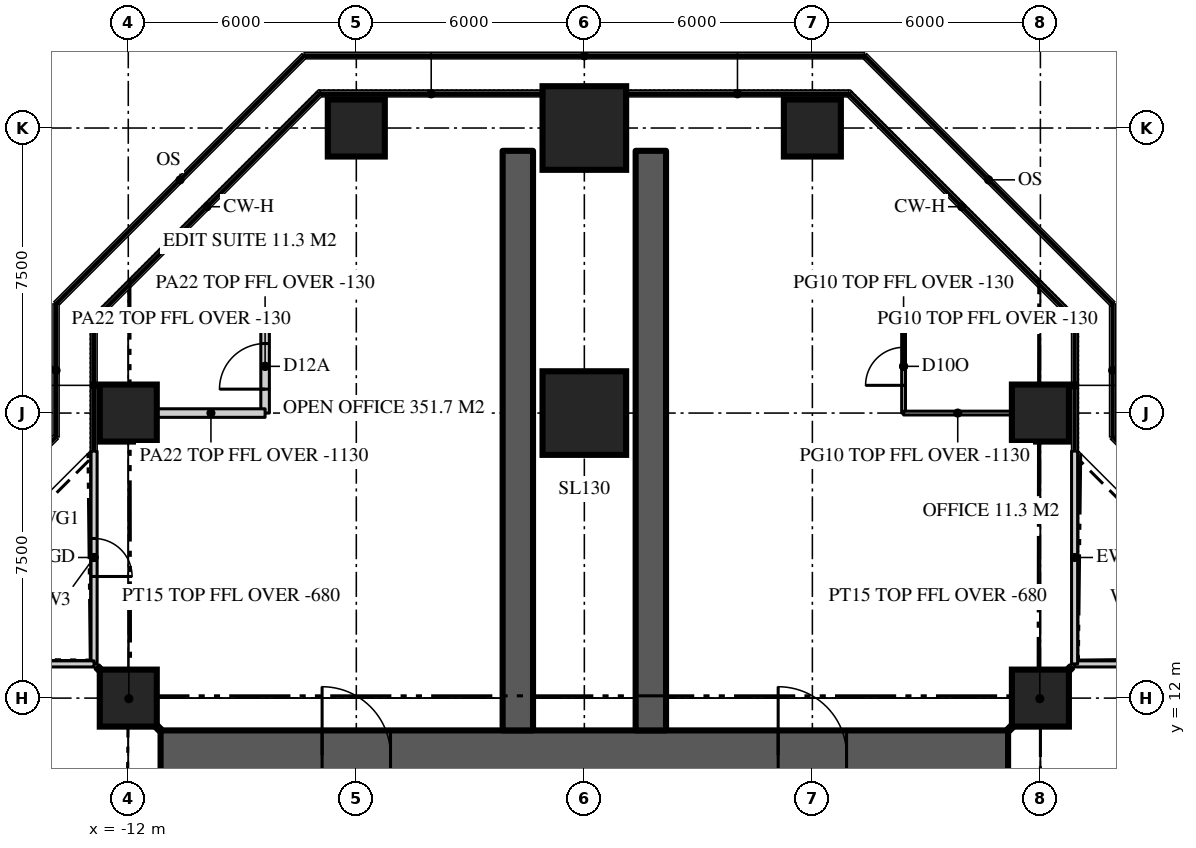
"""IFC4 building model, lengths in metres.
Left out: names, types, materials, properties, quantities, classifications, styles, units other than length and angle.
Written with IfcOpenShell. Run it as: python <this file> out.ifc"""

import sys

from ifc_helpers import new_model, si_unit, direction, frame, frame_2d, origin, origin_2d, place, context, subcontext, project, spatial, rectangle, extrude, element, fill, save


model = new_model("IFC4")
c1 = context("Model", 3, precision=1e-05, world=origin(), true_north=direction((0.0, 1.0)))
c2 = subcontext(c1, "Body", "Model", "MODEL_VIEW")
j1 = project(units=[si_unit("LENGTHUNIT", "METRE"), si_unit("PLANEANGLEUNIT", "RADIAN")], contexts=[c1])
p1 = place(None, origin())
s1 = spatial("IfcSite", under=j1, at=p1, CompositionType="ELEMENT")
p2 = place(p1, origin())
s2 = spatial("IfcBuilding", under=s1, at=p2, CompositionType="ELEMENT")
p3 = place(p2, frame((0.0, 0.0, 255.6)))
s3 = spatial("IfcBuildingStorey", under=s2, at=p3, CompositionType="ELEMENT", Elevation=255.6)
p4 = place(p3, frame((-11.15, 10.5, 0.0), z_axis=(0.0, 0.0, 1.0), x_axis=(1.0, 0.0, 0.0)))
e1 = element("IfcWall", 1, at=p4, inside=s3, PredefinedType="SHEAR", context=c2, shape_type="SweptSolid", body=[
    extrude(rectangle(XDim=22.3, YDim=1.3, at=frame_2d((11.15, 0.0))), origin(), (0.0, 0.0, 1.0), 3.9),
])
p5 = place(p4, frame((4.25, 0.0, 0.0)))
e2 = element("IfcOpeningElement", 2, at=p5, cuts=e1, PredefinedType="OPENING", context=c2, shape_type="SweptSolid", body=[
    extrude(rectangle(XDim=1.8, YDim=2.2, at=frame_2d((0.9, 1.1))), frame((0.0, 0.66, 0.0), z_axis=(0.0, -1.0, 0.0), x_axis=(1.0, 0.0, 0.0)), (0.0, 0.0, 1.0), 1.32),
])
p6 = place(p4, frame((16.25, 0.0, 0.0)))
e3 = element("IfcOpeningElement", 3, at=p6, cuts=e1, PredefinedType="OPENING", context=c2, shape_type="SweptSolid", body=[
    extrude(rectangle(XDim=1.8, YDim=2.2, at=frame_2d((0.9, 1.1))), frame((0.0, 0.66, 0.0), z_axis=(0.0, -1.0, 0.0), x_axis=(1.0, 0.0, 0.0)), (0.0, 0.0, 1.0), 1.32),
])
for number, where, z_axis, x_axis in (
    (4, (1.75, 11.15, 0.0), (0.0, 0.0, 1.0), (0.0, 1.0, 0.0)),
    (5, (-1.75, 11.15, 0.0), (0.0, 0.0, 1.0), (0.0, 1.0, 0.0)),
):
    element("IfcWall", number, at=place(p3, frame(where, z_axis=z_axis, x_axis=x_axis)), inside=s3, PredefinedType="SHEAR", context=c2, shape_type="SweptSolid", body=[
        extrude(rectangle(XDim=15.25, YDim=0.8, at=frame_2d((7.625, 0.0))), origin(), (0.0, 0.0, 1.0), 3.9),
    ])
for number, where, z_axis, x_axis in (
    (6, (-12.0, 12.0, 0.0), (0.0, 0.0, 1.0), (1.0, 0.0, 0.0)),
    (7, (12.0, 12.0, 0.0), (0.0, 0.0, 1.0), (1.0, 0.0, 0.0)),
    (8, (-12.0, 19.5, 0.0), (0.0, 0.0, 1.0), (1.0, 0.0, 0.0)),
):
    element("IfcColumn", number, at=place(p3, frame(where, z_axis=z_axis, x_axis=x_axis)), inside=s3, PredefinedType="COLUMN", context=c2, shape_type="SweptSolid", body=[
        extrude(rectangle(XDim=1.5, YDim=1.5, at=origin_2d()), origin(), (0.0, 0.0, 1.0), 3.9),
    ])
p7 = place(p3, frame((0.0, 19.5, 0.0), z_axis=(0.0, 0.0, 1.0), x_axis=(1.0, 0.0, 0.0)))
e9 = element("IfcColumn", 9, at=p7, inside=s3, PredefinedType="COLUMN", context=c2, shape_type="SweptSolid", body=[
    extrude(rectangle(XDim=2.2, YDim=2.2, at=origin_2d()), origin(), (0.0, 0.0, 1.0), 3.9),
])
for number, where, z_axis, x_axis in (
    (10, (12.0, 19.5, 0.0), (0.0, 0.0, 1.0), (1.0, 0.0, 0.0)),
    (11, (-6.0, 27.0, 0.0), (0.0, 0.0, 1.0), (1.0, 0.0, 0.0)),
):
    element("IfcColumn", number, at=place(p3, frame(where, z_axis=z_axis, x_axis=x_axis)), inside=s3, PredefinedType="COLUMN", context=c2, shape_type="SweptSolid", body=[
        extrude(rectangle(XDim=1.5, YDim=1.5, at=origin_2d()), origin(), (0.0, 0.0, 1.0), 3.9),
    ])
p8 = place(p3, frame((0.0, 27.0, 0.0), z_axis=(0.0, 0.0, 1.0), x_axis=(1.0, 0.0, 0.0)))
e12 = element("IfcColumn", 12, at=p8, inside=s3, PredefinedType="COLUMN", context=c2, shape_type="SweptSolid", body=[
    extrude(rectangle(XDim=2.2, YDim=2.2, at=origin_2d()), origin(), (0.0, 0.0, 1.0), 3.9),
])
p9 = place(p3, frame((6.0, 27.0, 0.0), z_axis=(0.0, 0.0, 1.0), x_axis=(1.0, 0.0, 0.0)))
e13 = element("IfcColumn", 13, at=p9, inside=s3, PredefinedType="COLUMN", context=c2, shape_type="SweptSolid", body=[
    extrude(rectangle(XDim=1.5, YDim=1.5, at=origin_2d()), origin(), (0.0, 0.0, 1.0), 3.9),
])
p10 = place(p3, frame((18.5, 12.9, 0.0), z_axis=(0.0, 0.0, 1.0), x_axis=(-1.0, 0.0, 0.0)))
e14 = element("IfcWall", 14, at=p10, inside=s3, PredefinedType="SOLIDWALL", context=c2, shape_type="SweptSolid", body=[
    extrude(rectangle(XDim=5.6, YDim=0.16, at=frame_2d((2.8, 0.0))), origin(), (0.0, 0.0, 1.0), 3.77),
])
p11 = place(p10, frame((2.3, 0.0, 0.0)))
e15 = element("IfcOpeningElement", 15, at=p11, cuts=e14, PredefinedType="OPENING", context=c2, shape_type="SweptSolid", body=[
    extrude(rectangle(XDim=1.0, YDim=2.2, at=frame_2d((0.5, 1.1))), frame((0.0, 0.09, 0.0), z_axis=(0.0, -1.0, 0.0), x_axis=(1.0, 0.0, 0.0)), (0.0, 0.0, 1.0), 0.18),
])
p12 = place(p3, frame((12.9, 12.9, 0.0), z_axis=(0.0, 0.0, 1.0), x_axis=(0.0, 1.0, 0.0)))
e16 = element("IfcWall", 16, at=p12, inside=s3, PredefinedType="SOLIDWALL", context=c2, shape_type="SweptSolid", body=[
    extrude(rectangle(XDim=5.6, YDim=0.16, at=frame_2d((2.8, 0.0))), origin(), (0.0, 0.0, 1.0), 3.77),
])
p13 = place(p3, frame((-12.9, 18.5, 0.0), z_axis=(0.0, 0.0, 1.0), x_axis=(0.0, -1.0, 0.0)))
e17 = element("IfcWall", 17, at=p13, inside=s3, PredefinedType="SOLIDWALL", context=c2, shape_type="SweptSolid", body=[
    extrude(rectangle(XDim=5.6, YDim=0.16, at=frame_2d((2.8, 0.0))), origin(), (0.0, 0.0, 1.0), 3.77),
])
p14 = place(p13, frame((2.3, 0.0, 0.0)))
e18 = element("IfcOpeningElement", 18, at=p14, cuts=e17, PredefinedType="OPENING", context=c2, shape_type="SweptSolid", body=[
    extrude(rectangle(XDim=1.0, YDim=2.2, at=frame_2d((0.5, 1.1))), frame((0.0, 0.09, 0.0), z_axis=(0.0, -1.0, 0.0), x_axis=(1.0, 0.0, 0.0)), (0.0, 0.0, 1.0), 0.18),
])
p15 = place(p3, frame((-12.9, 12.9, 0.0), z_axis=(0.0, 0.0, 1.0), x_axis=(-1.0, 0.0, 0.0)))
e19 = element("IfcWall", 19, at=p15, inside=s3, PredefinedType="SOLIDWALL", context=c2, shape_type="SweptSolid", body=[
    extrude(rectangle(XDim=5.6, YDim=0.16, at=frame_2d((2.8, 0.0))), origin(), (0.0, 0.0, 1.0), 3.77),
])
p16 = place(p3, frame((-8.4, 19.5, 0.0), z_axis=(0.0, 0.0, 1.0), x_axis=(0.0, 1.0, 0.0)))
e20 = element("IfcWall", 20, at=p16, inside=s3, PredefinedType="PARTITIONING", context=c2, shape_type="SweptSolid", body=[
    extrude(rectangle(XDim=2.459, YDim=0.225, at=frame_2d((1.229, 0.0))), origin(), (0.0, 0.0, 1.0), 3.77),
])
p17 = place(p16, frame((0.629, 0.0, 0.0)))
e21 = element("IfcOpeningElement", 21, at=p17, cuts=e20, PredefinedType="OPENING", context=c2, shape_type="SweptSolid", body=[
    extrude(rectangle(XDim=1.2, YDim=2.2, at=frame_2d((0.6, 1.1))), frame((0.0, 0.123, 0.0), z_axis=(0.0, -1.0, 0.0), x_axis=(1.0, 0.0, 0.0)), (0.0, 0.0, 1.0), 0.245),
])
p18 = place(p3, frame((-8.4, 19.5, 0.0), z_axis=(0.0, 0.0, 1.0), x_axis=(-1.0, 0.0, 0.0)))
e22 = element("IfcWall", 22, at=p18, inside=s3, PredefinedType="PARTITIONING", context=c2, shape_type="SweptSolid", body=[
    extrude(rectangle(XDim=2.85, YDim=0.225, at=frame_2d((1.425, 0.0))), origin(), (0.0, 0.0, 1.0), 2.77),
])
p19 = place(p3, frame((-8.4, 21.959, 0.0), z_axis=(0.0, 0.0, 1.0), x_axis=(-1.0, 0.0, 0.0)))
e23 = element("IfcWall", 23, at=p19, inside=s3, PredefinedType="PARTITIONING", context=c2, shape_type="SweptSolid", body=[
    extrude(rectangle(XDim=4.42, YDim=0.225, at=frame_2d((2.21, 0.0))), origin(), (0.0, 0.0, 1.0), 3.77),
])
p20 = place(p3, frame((8.4, 19.5, 0.0), z_axis=(0.0, 0.0, 1.0), x_axis=(0.0, 1.0, 0.0)))
e24 = element("IfcWall", 24, at=p20, inside=s3, PredefinedType="PARTITIONING", context=c2, shape_type="SweptSolid", body=[
    extrude(rectangle(XDim=2.459, YDim=0.1, at=frame_2d((1.229, 0.0))), origin(), (0.0, 0.0, 1.0), 3.77),
])
p21 = place(p20, frame((0.729, 0.0, 0.0)))
e25 = element("IfcOpeningElement", 25, at=p21, cuts=e24, PredefinedType="OPENING", context=c2, shape_type="SweptSolid", body=[
    extrude(rectangle(XDim=1.0, YDim=2.2, at=frame_2d((0.5, 1.1))), frame((0.0, 0.06, 0.0), z_axis=(0.0, -1.0, 0.0), x_axis=(1.0, 0.0, 0.0)), (0.0, 0.0, 1.0), 0.12),
])
p22 = place(p3, frame((8.4, 19.5, 0.0), z_axis=(0.0, 0.0, 1.0), x_axis=(1.0, 0.0, 0.0)))
e26 = element("IfcWall", 26, at=p22, inside=s3, PredefinedType="PARTITIONING", context=c2, shape_type="SweptSolid", body=[
    extrude(rectangle(XDim=2.85, YDim=0.1, at=frame_2d((1.425, 0.0))), origin(), (0.0, 0.0, 1.0), 2.77),
])
p23 = place(p3, frame((8.4, 21.959, 0.0), z_axis=(0.0, 0.0, 1.0), x_axis=(1.0, 0.0, 0.0)))
e27 = element("IfcWall", 27, at=p23, inside=s3, PredefinedType="PARTITIONING", context=c2, shape_type="SweptSolid", body=[
    extrude(rectangle(XDim=4.42, YDim=0.1, at=frame_2d((2.21, 0.0))), origin(), (0.0, 0.0, 1.0), 3.77),
])
for number, where, z_axis, x_axis in (
    (28, (11.15, 11.15, 0.0), (0.0, 0.0, 1.0), (0.707, 0.707, 0.0)),
    (29, (-11.15, 11.15, 0.0), (0.0, 0.0, 1.0), (-0.707, 0.707, 0.0)),
):
    element("IfcWall", number, at=place(p3, frame(where, z_axis=z_axis, x_axis=x_axis)), inside=s3, PredefinedType="PARTITIONING", context=c2, shape_type="SweptSolid", body=[
        extrude(rectangle(XDim=2.362, YDim=0.15, at=frame_2d((1.181, 0.0))), origin(), (0.0, 0.0, 1.0), 3.22),
    ])
p24 = place(p14, origin())
e30 = element("IfcDoor", 30, at=p24, inside=s3, OperationType="SINGLE_SWING_RIGHT", PredefinedType="DOOR", context=c2, shape_type="SweptSolid", body=[
    extrude(rectangle(XDim=1.0, YDim=2.2, at=frame_2d((0.5, 1.1))), frame((0.0, 0.025, 0.0), z_axis=(0.0, -1.0, 0.0), x_axis=(1.0, 0.0, 0.0)), (0.0, 0.0, 1.0), 0.05),
])
fill(e18, e30)
p25 = place(p5, origin())
e31 = element("IfcDoor", 31, at=p25, inside=s3, OperationType="DOUBLE_DOOR_DOUBLE_SWING", PredefinedType="DOOR", context=c2, shape_type="SweptSolid", body=[
    extrude(rectangle(XDim=1.8, YDim=2.2, at=frame_2d((0.9, 1.1))), frame((0.0, 0.025, 0.0), z_axis=(0.0, -1.0, 0.0), x_axis=(1.0, 0.0, 0.0)), (0.0, 0.0, 1.0), 0.05),
])
fill(e2, e31)
p26 = place(p6, origin())
e32 = element("IfcDoor", 32, at=p26, inside=s3, OperationType="DOUBLE_DOOR_DOUBLE_SWING", PredefinedType="DOOR", context=c2, shape_type="SweptSolid", body=[
    extrude(rectangle(XDim=1.8, YDim=2.2, at=frame_2d((0.9, 1.1))), frame((0.0, 0.025, 0.0), z_axis=(0.0, -1.0, 0.0), x_axis=(1.0, 0.0, 0.0)), (0.0, 0.0, 1.0), 0.05),
])
fill(e3, e32)
p27 = place(p17, origin())
e33 = element("IfcDoor", 33, at=p27, inside=s3, OperationType="SINGLE_SWING_LEFT", PredefinedType="DOOR", context=c2, shape_type="SweptSolid", body=[
    extrude(rectangle(XDim=1.2, YDim=2.2, at=frame_2d((0.6, 1.1))), frame((0.0, 0.025, 0.0), z_axis=(0.0, -1.0, 0.0), x_axis=(1.0, 0.0, 0.0)), (0.0, 0.0, 1.0), 0.05),
])
fill(e21, e33)
p28 = place(p21, origin())
e34 = element("IfcDoor", 34, at=p28, inside=s3, OperationType="SINGLE_SWING_LEFT", PredefinedType="DOOR", context=c2, shape_type="SweptSolid", body=[
    extrude(rectangle(XDim=1.0, YDim=2.2, at=frame_2d((0.5, 1.1))), frame((0.0, 0.025, 0.0), z_axis=(0.0, -1.0, 0.0), x_axis=(1.0, 0.0, 0.0)), (0.0, 0.0, 1.0), 0.05),
])
fill(e25, e34)
save(model, sys.argv[1])
